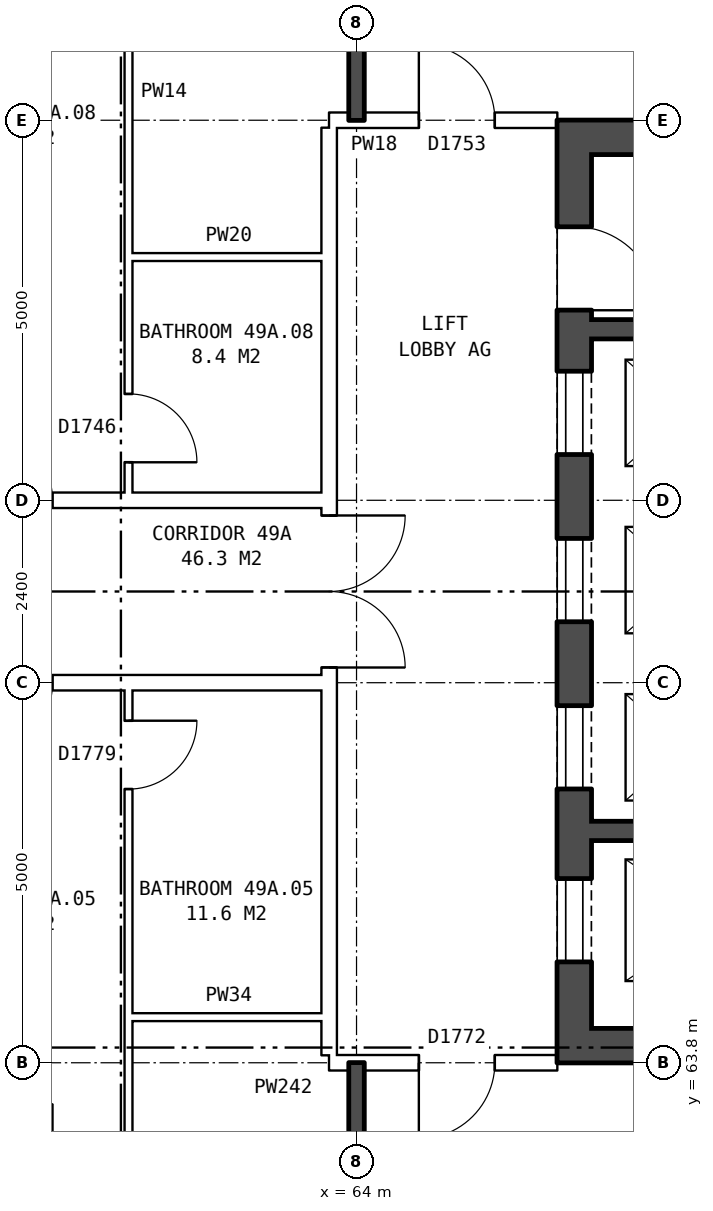
"""IFC4 building model, lengths in metres.
Left out: names, types, materials, properties, quantities, classifications, styles, units other than length and angle.
Written with IfcOpenShell. Run it as: python <this file> out.ifc"""

import sys

from ifc_helpers import new_model, si_unit, direction, frame, frame_2d, origin, place, context, subcontext, project, spatial, rectangle, extrude, element, fill, save


model = new_model("IFC4")
c1 = context("Model", 3, precision=1e-05, world=origin(), true_north=direction((0.0, 1.0)))
c2 = subcontext(c1, "Body", "Model", "MODEL_VIEW")
j1 = project(units=[si_unit("LENGTHUNIT", "METRE"), si_unit("PLANEANGLEUNIT", "RADIAN")], contexts=[c1])
p1 = place(None, origin())
s1 = spatial("IfcSite", under=j1, at=p1, CompositionType="ELEMENT")
p2 = place(p1, origin())
s2 = spatial("IfcBuilding", under=s1, at=p2, CompositionType="ELEMENT")
p3 = place(p2, frame((0.0, 0.0, 175.8)))
s3 = spatial("IfcBuildingStorey", under=s2, at=p3, CompositionType="ELEMENT", Elevation=175.8)
p4 = place(p3, frame((66.865, 63.8, 0.0), z_axis=(0.0, 0.0, 1.0), x_axis=(0.0, 1.0, 0.0)))
e1 = element("IfcWall", 1, at=p4, inside=s3, PredefinedType="SHEAR", context=c2, shape_type="SweptSolid", body=[
    extrude(rectangle(XDim=12.4, YDim=0.45, at=frame_2d((6.2, 0.0))), origin(), (0.0, 0.0, 1.0), 2.85),
])
p5 = place(p4, frame((1.325, 0.0, 0.0)))
e2 = element("IfcOpeningElement", 2, at=p5, cuts=e1, PredefinedType="OPENING", context=c2, shape_type="SweptSolid", body=[
    extrude(rectangle(XDim=1.1, YDim=2.1, at=frame_2d((0.55, 1.05))), frame((0.0, 0.235, 0.0), z_axis=(0.0, -1.0, 0.0), x_axis=(1.0, 0.0, 0.0)), (0.0, 0.0, 1.0), 0.47),
])
p6 = place(p4, frame((3.6, 0.0, 0.0)))
e3 = element("IfcOpeningElement", 3, at=p6, cuts=e1, PredefinedType="OPENING", context=c2, shape_type="SweptSolid", body=[
    extrude(rectangle(XDim=1.1, YDim=2.1, at=frame_2d((0.55, 1.05))), frame((0.0, 0.235, 0.0), z_axis=(0.0, -1.0, 0.0), x_axis=(1.0, 0.0, 0.0)), (0.0, 0.0, 1.0), 0.47),
])
p7 = place(p4, frame((5.8, 0.0, 0.0)))
e4 = element("IfcOpeningElement", 4, at=p7, cuts=e1, PredefinedType="OPENING", context=c2, shape_type="SweptSolid", body=[
    extrude(rectangle(XDim=1.1, YDim=2.1, at=frame_2d((0.55, 1.05))), frame((0.0, 0.235, 0.0), z_axis=(0.0, -1.0, 0.0), x_axis=(1.0, 0.0, 0.0)), (0.0, 0.0, 1.0), 0.47),
])
p8 = place(p4, frame((8.0, 0.0, 0.0)))
e5 = element("IfcOpeningElement", 5, at=p8, cuts=e1, PredefinedType="OPENING", context=c2, shape_type="SweptSolid", body=[
    extrude(rectangle(XDim=1.1, YDim=2.1, at=frame_2d((0.55, 1.05))), frame((0.0, 0.235, 0.0), z_axis=(0.0, -1.0, 0.0), x_axis=(1.0, 0.0, 0.0)), (0.0, 0.0, 1.0), 0.47),
])
p9 = place(p4, frame((9.9, 0.0, 0.0)))
e6 = element("IfcOpeningElement", 6, at=p9, cuts=e1, PredefinedType="OPENING", context=c2, shape_type="SweptSolid", body=[
    extrude(rectangle(XDim=1.1, YDim=2.1, at=frame_2d((0.55, 1.05))), frame((0.0, 0.235, 0.0), z_axis=(0.0, -1.0, 0.0), x_axis=(1.0, 0.0, 0.0)), (0.0, 0.0, 1.0), 0.47),
])
for number, where, z_axis, x_axis in (
    (7, (67.09, 64.025, 0.0), (0.0, 0.0, 1.0), (1.0, 0.0, 0.0)),
    (8, (67.09, 75.975, 0.0), (0.0, 0.0, 1.0), (1.0, 0.0, 0.0)),
):
    element("IfcWall", number, at=place(p3, frame(where, z_axis=z_axis, x_axis=x_axis)), inside=s3, PredefinedType="SHEAR", context=c2, shape_type="SweptSolid", body=[
        extrude(rectangle(XDim=8.1, YDim=0.45, at=frame_2d((4.05, 0.0))), origin(), (0.0, 0.0, 1.0), 2.85),
    ])
p10 = place(p3, frame((67.09, 66.85, 0.0), z_axis=(0.0, 0.0, 1.0), x_axis=(1.0, 0.0, 0.0)))
e9 = element("IfcWall", 9, at=p10, inside=s3, PredefinedType="SHEAR", context=c2, shape_type="SweptSolid", body=[
    extrude(rectangle(XDim=3.545, YDim=0.25, at=frame_2d((1.772, 0.0))), origin(), (0.0, 0.0, 1.0), 2.85),
])
p11 = place(p3, frame((67.09, 73.45, 0.0), z_axis=(0.0, 0.0, 1.0), x_axis=(1.0, 0.0, 0.0)))
e10 = element("IfcWall", 10, at=p11, inside=s3, PredefinedType="SHEAR", context=c2, shape_type="SweptSolid", body=[
    extrude(rectangle(XDim=2.475, YDim=0.25, at=frame_2d((1.237, 0.0))), origin(), (0.0, 0.0, 1.0), 2.85),
])
p12 = place(p3, frame((63.64, 63.9, 0.0), z_axis=(0.0, 0.0, 1.0), x_axis=(0.0, 1.0, 0.0)))
e11 = element("IfcWall", 11, at=p12, inside=s3, PredefinedType="PARTITIONING", context=c2, shape_type="SweptSolid", body=[
    extrude(rectangle(XDim=12.2, YDim=0.2, at=frame_2d((6.1, 0.0))), origin(), (0.0, 0.0, 1.0), 2.85),
])
p13 = place(p12, frame((5.1, 0.0, 0.0)))
e12 = element("IfcOpeningElement", 12, at=p13, cuts=e11, PredefinedType="OPENING", context=c2, shape_type="SweptSolid", body=[
    extrude(rectangle(XDim=2.0, YDim=2.1, at=frame_2d((1.0, 1.05))), frame((0.0, 0.11, 0.0), z_axis=(0.0, -1.0, 0.0), x_axis=(1.0, 0.0, 0.0)), (0.0, 0.0, 1.0), 0.22),
])
p14 = place(p3, frame((63.64, 63.8, 0.0), z_axis=(0.0, 0.0, 1.0), x_axis=(1.0, 0.0, 0.0)))
e13 = element("IfcWall", 13, at=p14, inside=s3, PredefinedType="PARTITIONING", context=c2, shape_type="SweptSolid", body=[
    extrude(rectangle(XDim=3.0, YDim=0.2, at=frame_2d((1.5, 0.0))), origin(), (0.0, 0.0, 1.0), 2.85),
])
p15 = place(p14, frame((1.18, 0.0, 0.0)))
e14 = element("IfcOpeningElement", 14, at=p15, cuts=e13, PredefinedType="OPENING", context=c2, shape_type="SweptSolid", body=[
    extrude(rectangle(XDim=1.0, YDim=2.1, at=frame_2d((0.5, 1.05))), frame((0.0, 0.11, 0.0), z_axis=(0.0, -1.0, 0.0), x_axis=(1.0, 0.0, 0.0)), (0.0, 0.0, 1.0), 0.22),
])
p16 = place(p3, frame((61.0, 64.4, 0.0), z_axis=(0.0, 0.0, 1.0), x_axis=(1.0, 0.0, 0.0)))
e15 = element("IfcWall", 15, at=p16, inside=s3, PredefinedType="PARTITIONING", context=c2, shape_type="SweptSolid", body=[
    extrude(rectangle(XDim=2.64, YDim=0.1, at=frame_2d((1.32, 0.0))), origin(), (0.0, 0.0, 1.0), 2.85),
])
p17 = place(p3, frame((44.36, 68.8, 0.0), z_axis=(0.0, 0.0, 1.0), x_axis=(1.0, 0.0, 0.0)))
e16 = element("IfcWall", 16, at=p17, inside=s3, PredefinedType="PARTITIONING", context=c2, shape_type="SweptSolid", body=[
    extrude(rectangle(XDim=19.28, YDim=0.2, at=frame_2d((9.64, 0.0))), origin(), (0.0, 0.0, 1.0), 2.85),
])
p18 = place(p17, frame((14.64, 0.0, 0.0)))
e17 = element("IfcOpeningElement", 17, at=p18, cuts=e16, PredefinedType="OPENING", context=c2, shape_type="SweptSolid", body=[
    extrude(rectangle(XDim=1.0, YDim=2.1, at=frame_2d((0.5, 1.05))), frame((0.0, 0.11, 0.0), z_axis=(0.0, -1.0, 0.0), x_axis=(1.0, 0.0, 0.0)), (0.0, 0.0, 1.0), 0.22),
])
p19 = place(p17, frame((11.64, 0.0, 0.0)))
e18 = element("IfcOpeningElement", 18, at=p19, cuts=e16, PredefinedType="OPENING", context=c2, shape_type="SweptSolid", body=[
    extrude(rectangle(XDim=1.0, YDim=2.1, at=frame_2d((0.5, 1.05))), frame((0.0, 0.11, 0.0), z_axis=(0.0, -1.0, 0.0), x_axis=(1.0, 0.0, 0.0)), (0.0, 0.0, 1.0), 0.22),
])
p20 = place(p17, frame((5.64, 0.0, 0.0)))
e19 = element("IfcOpeningElement", 19, at=p20, cuts=e16, PredefinedType="OPENING", context=c2, shape_type="SweptSolid", body=[
    extrude(rectangle(XDim=1.0, YDim=2.1, at=frame_2d((0.5, 1.05))), frame((0.0, 0.11, 0.0), z_axis=(0.0, -1.0, 0.0), x_axis=(1.0, 0.0, 0.0)), (0.0, 0.0, 1.0), 0.22),
])
p21 = place(p3, frame((44.36, 71.2, 0.0), z_axis=(0.0, 0.0, 1.0), x_axis=(1.0, 0.0, 0.0)))
e20 = element("IfcWall", 20, at=p21, inside=s3, PredefinedType="PARTITIONING", context=c2, shape_type="SweptSolid", body=[
    extrude(rectangle(XDim=19.28, YDim=0.2, at=frame_2d((9.64, 0.0))), origin(), (0.0, 0.0, 1.0), 2.85),
])
p22 = place(p21, frame((14.64, 0.0, 0.0)))
e21 = element("IfcOpeningElement", 21, at=p22, cuts=e20, PredefinedType="OPENING", context=c2, shape_type="SweptSolid", body=[
    extrude(rectangle(XDim=1.0, YDim=2.1, at=frame_2d((0.5, 1.05))), frame((0.0, 0.11, 0.0), z_axis=(0.0, -1.0, 0.0), x_axis=(1.0, 0.0, 0.0)), (0.0, 0.0, 1.0), 0.22),
])
p23 = place(p21, frame((5.64, 0.0, 0.0)))
e22 = element("IfcOpeningElement", 22, at=p23, cuts=e20, PredefinedType="OPENING", context=c2, shape_type="SweptSolid", body=[
    extrude(rectangle(XDim=1.0, YDim=2.1, at=frame_2d((0.5, 1.05))), frame((0.0, 0.11, 0.0), z_axis=(0.0, -1.0, 0.0), x_axis=(1.0, 0.0, 0.0)), (0.0, 0.0, 1.0), 0.22),
])
p24 = place(p3, frame((61.0, 74.4, 0.0), z_axis=(0.0, 0.0, 1.0), x_axis=(1.0, 0.0, 0.0)))
e23 = element("IfcWall", 23, at=p24, inside=s3, PredefinedType="PARTITIONING", context=c2, shape_type="SweptSolid", body=[
    extrude(rectangle(XDim=2.64, YDim=0.1, at=frame_2d((1.32, 0.0))), origin(), (0.0, 0.0, 1.0), 2.85),
])
p25 = place(p3, frame((63.64, 76.2, 0.0), z_axis=(0.0, 0.0, 1.0), x_axis=(1.0, 0.0, 0.0)))
e24 = element("IfcWall", 24, at=p25, inside=s3, PredefinedType="PARTITIONING", context=c2, shape_type="SweptSolid", body=[
    extrude(rectangle(XDim=3.0, YDim=0.2, at=frame_2d((1.5, 0.0))), origin(), (0.0, 0.0, 1.0), 2.85),
])
p26 = place(p25, frame((1.18, 0.0, 0.0)))
e25 = element("IfcOpeningElement", 25, at=p26, cuts=e24, PredefinedType="OPENING", context=c2, shape_type="SweptSolid", body=[
    extrude(rectangle(XDim=1.0, YDim=2.1, at=frame_2d((0.5, 1.05))), frame((0.0, 0.11, 0.0), z_axis=(0.0, -1.0, 0.0), x_axis=(1.0, 0.0, 0.0)), (0.0, 0.0, 1.0), 0.22),
])
p27 = place(p3, frame((61.0, 54.36, 0.0), z_axis=(0.0, 0.0, 1.0), x_axis=(0.0, 1.0, 0.0)))
e26 = element("IfcWall", 26, at=p27, inside=s3, PredefinedType="PARTITIONING", context=c2, shape_type="SweptSolid", body=[
    extrude(rectangle(XDim=14.34, YDim=0.1, at=frame_2d((7.17, 0.0))), origin(), (0.0, 0.0, 1.0), 2.85),
])
p28 = place(p27, frame((6.7, 0.0, 0.0)))
e27 = element("IfcOpeningElement", 27, at=p28, cuts=e26, PredefinedType="OPENING", context=c2, shape_type="SweptSolid", body=[
    extrude(rectangle(XDim=0.9, YDim=2.1, at=frame_2d((0.45, 1.05))), frame((0.0, 0.06, 0.0), z_axis=(0.0, -1.0, 0.0), x_axis=(1.0, 0.0, 0.0)), (0.0, 0.0, 1.0), 0.12),
])
p29 = place(p27, frame((13.04, 0.0, 0.0)))
e28 = element("IfcOpeningElement", 28, at=p29, cuts=e26, PredefinedType="OPENING", context=c2, shape_type="SweptSolid", body=[
    extrude(rectangle(XDim=0.9, YDim=2.1, at=frame_2d((0.45, 1.05))), frame((0.0, 0.06, 0.0), z_axis=(0.0, -1.0, 0.0), x_axis=(1.0, 0.0, 0.0)), (0.0, 0.0, 1.0), 0.12),
])
p30 = place(p3, frame((61.0, 71.3, 0.0), z_axis=(0.0, 0.0, 1.0), x_axis=(0.0, 1.0, 0.0)))
e29 = element("IfcWall", 29, at=p30, inside=s3, PredefinedType="PARTITIONING", context=c2, shape_type="SweptSolid", body=[
    extrude(rectangle(XDim=14.34, YDim=0.1, at=frame_2d((7.17, 0.0))), origin(), (0.0, 0.0, 1.0), 2.85),
])
p31 = place(p30, frame((9.24, 0.0, 0.0)))
e30 = element("IfcOpeningElement", 30, at=p31, cuts=e29, PredefinedType="OPENING", context=c2, shape_type="SweptSolid", body=[
    extrude(rectangle(XDim=0.9, YDim=2.1, at=frame_2d((0.45, 1.05))), frame((0.0, 0.06, 0.0), z_axis=(0.0, -1.0, 0.0), x_axis=(1.0, 0.0, 0.0)), (0.0, 0.0, 1.0), 0.12),
])
p32 = place(p30, frame((0.4, 0.0, 0.0)))
e31 = element("IfcOpeningElement", 31, at=p32, cuts=e29, PredefinedType="OPENING", context=c2, shape_type="SweptSolid", body=[
    extrude(rectangle(XDim=0.9, YDim=2.1, at=frame_2d((0.45, 1.05))), frame((0.0, 0.06, 0.0), z_axis=(0.0, -1.0, 0.0), x_axis=(1.0, 0.0, 0.0)), (0.0, 0.0, 1.0), 0.12),
])
for number, where, z_axis, x_axis in (
    (32, (64.0, 54.36, 0.0), (0.0, 0.0, 1.0), (0.0, 1.0, 0.0)),
    (33, (64.0, 76.2, 0.0), (0.0, 0.0, 1.0), (0.0, 1.0, 0.0)),
):
    element("IfcWall", number, at=place(p3, frame(where, z_axis=z_axis, x_axis=x_axis)), inside=s3, PredefinedType="SOLIDWALL", context=c2, shape_type="SweptSolid", body=[
        extrude(rectangle(XDim=9.44, YDim=0.2, at=frame_2d((4.72, 0.0))), origin(), (0.0, 0.0, 1.0), 2.85),
    ])
p33 = place(p5, origin())
e34 = element("IfcDoor", 34, at=p33, inside=s3, OperationType="DOUBLE_DOOR_SLIDING", PredefinedType="DOOR", context=c2, shape_type="SweptSolid", body=[
    extrude(rectangle(XDim=1.1, YDim=2.1, at=frame_2d((0.55, 1.05))), frame((0.0, -0.16, 0.0), z_axis=(0.0, -1.0, 0.0), x_axis=(1.0, 0.0, 0.0)), (0.0, 0.0, 1.0), 0.05),
])
fill(e2, e34)
p34 = place(p6, origin())
e35 = element("IfcDoor", 35, at=p34, inside=s3, OperationType="DOUBLE_DOOR_SLIDING", PredefinedType="DOOR", context=c2, shape_type="SweptSolid", body=[
    extrude(rectangle(XDim=1.1, YDim=2.1, at=frame_2d((0.55, 1.05))), frame((0.0, -0.16, 0.0), z_axis=(0.0, -1.0, 0.0), x_axis=(1.0, 0.0, 0.0)), (0.0, 0.0, 1.0), 0.05),
])
fill(e3, e35)
p35 = place(p7, origin())
e36 = element("IfcDoor", 36, at=p35, inside=s3, OperationType="DOUBLE_DOOR_SLIDING", PredefinedType="DOOR", context=c2, shape_type="SweptSolid", body=[
    extrude(rectangle(XDim=1.1, YDim=2.1, at=frame_2d((0.55, 1.05))), frame((0.0, -0.16, 0.0), z_axis=(0.0, -1.0, 0.0), x_axis=(1.0, 0.0, 0.0)), (0.0, 0.0, 1.0), 0.05),
])
fill(e4, e36)
p36 = place(p8, origin())
e37 = element("IfcDoor", 37, at=p36, inside=s3, OperationType="DOUBLE_DOOR_SLIDING", PredefinedType="DOOR", context=c2, shape_type="SweptSolid", body=[
    extrude(rectangle(XDim=1.1, YDim=2.1, at=frame_2d((0.55, 1.05))), frame((0.0, -0.16, 0.0), z_axis=(0.0, -1.0, 0.0), x_axis=(1.0, 0.0, 0.0)), (0.0, 0.0, 1.0), 0.05),
])
fill(e5, e37)
p37 = place(p9, frame((1.1, 0.0, 0.0), z_axis=(0.0, 0.0, 1.0), x_axis=(-1.0, 0.0, 0.0)))
e38 = element("IfcDoor", 38, at=p37, inside=s3, OperationType="SINGLE_SWING_RIGHT", PredefinedType="DOOR", context=c2, shape_type="SweptSolid", body=[
    extrude(rectangle(XDim=1.1, YDim=2.1, at=frame_2d((0.55, 1.05))), frame((0.0, 0.21, 0.0), z_axis=(0.0, -1.0, 0.0), x_axis=(1.0, 0.0, 0.0)), (0.0, 0.0, 1.0), 0.05),
])
fill(e6, e38)
p38 = place(p13, frame((2.0, 0.0, 0.0), z_axis=(0.0, 0.0, 1.0), x_axis=(-1.0, 0.0, 0.0)))
e39 = element("IfcDoor", 39, at=p38, inside=s3, OperationType="DOUBLE_DOOR_SINGLE_SWING", PredefinedType="DOOR", context=c2, shape_type="SweptSolid", body=[
    extrude(rectangle(XDim=2.0, YDim=2.1, at=frame_2d((1.0, 1.05))), frame((0.0, 0.025, 0.0), z_axis=(0.0, -1.0, 0.0), x_axis=(1.0, 0.0, 0.0)), (0.0, 0.0, 1.0), 0.05),
])
fill(e12, e39)
p39 = place(p15, frame((1.0, 0.0, 0.0), z_axis=(0.0, 0.0, 1.0), x_axis=(-1.0, 0.0, 0.0)))
e40 = element("IfcDoor", 40, at=p39, inside=s3, OperationType="SINGLE_SWING_RIGHT", PredefinedType="DOOR", context=c2, shape_type="SweptSolid", body=[
    extrude(rectangle(XDim=1.0, YDim=2.1, at=frame_2d((0.5, 1.05))), frame((0.0, 0.025, 0.0), z_axis=(0.0, -1.0, 0.0), x_axis=(1.0, 0.0, 0.0)), (0.0, 0.0, 1.0), 0.05),
])
fill(e14, e40)
p40 = place(p26, origin())
e41 = element("IfcDoor", 41, at=p40, inside=s3, OperationType="SINGLE_SWING_LEFT", PredefinedType="DOOR", context=c2, shape_type="SweptSolid", body=[
    extrude(rectangle(XDim=1.0, YDim=2.1, at=frame_2d((0.5, 1.05))), frame((0.0, 0.025, 0.0), z_axis=(0.0, -1.0, 0.0), x_axis=(1.0, 0.0, 0.0)), (0.0, 0.0, 1.0), 0.05),
])
fill(e25, e41)
p41 = place(p29, frame((0.9, 0.0, 0.0), z_axis=(0.0, 0.0, 1.0), x_axis=(-1.0, 0.0, 0.0)))
e42 = element("IfcDoor", 42, at=p41, inside=s3, OperationType="SINGLE_SWING_LEFT", PredefinedType="DOOR", context=c2, shape_type="SweptSolid", body=[
    extrude(rectangle(XDim=0.9, YDim=2.1, at=frame_2d((0.45, 1.05))), frame((0.0, 0.025, 0.0), z_axis=(0.0, -1.0, 0.0), x_axis=(1.0, 0.0, 0.0)), (0.0, 0.0, 1.0), 0.05),
])
fill(e28, e42)
p42 = place(p32, frame((0.9, 0.0, 0.0), z_axis=(0.0, 0.0, 1.0), x_axis=(-1.0, 0.0, 0.0)))
e43 = element("IfcDoor", 43, at=p42, inside=s3, OperationType="SINGLE_SWING_RIGHT", PredefinedType="DOOR", context=c2, shape_type="SweptSolid", body=[
    extrude(rectangle(XDim=0.9, YDim=2.1, at=frame_2d((0.45, 1.05))), frame((0.0, 0.025, 0.0), z_axis=(0.0, -1.0, 0.0), x_axis=(1.0, 0.0, 0.0)), (0.0, 0.0, 1.0), 0.05),
])
fill(e31, e43)
save(model, sys.argv[1])
